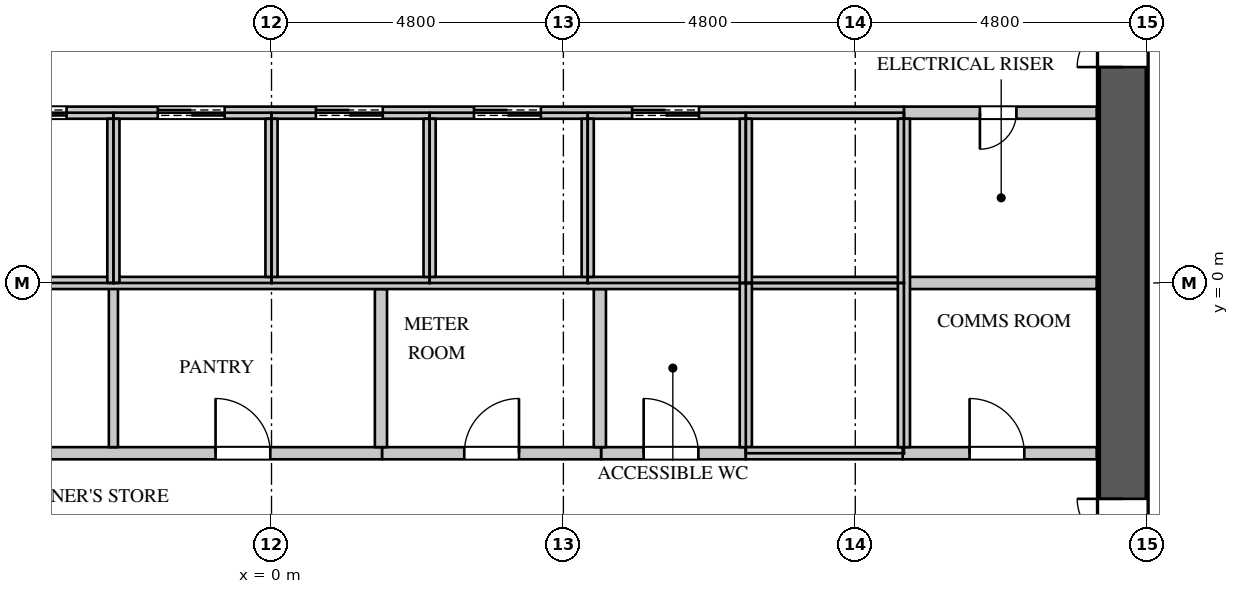
"""IFC4 building model, lengths in metres.
Left out: names, types, materials, properties, quantities, classifications, styles, units other than length and angle.
Written with IfcOpenShell. Run it as: python <this file> out.ifc"""

import sys

from ifc_helpers import new_model, si_unit, direction, frame, frame_2d, origin, place, context, subcontext, project, spatial, rectangle, extrude, element, fill, save


model = new_model("IFC4")
c1 = context("Model", 3, precision=1e-05, world=origin(), true_north=direction((0.0, 1.0)))
c2 = subcontext(c1, "Body", "Model", "MODEL_VIEW")
j1 = project(units=[si_unit("LENGTHUNIT", "METRE"), si_unit("PLANEANGLEUNIT", "RADIAN")], contexts=[c1])
p1 = place(None, origin())
s1 = spatial("IfcSite", under=j1, at=p1, CompositionType="ELEMENT")
p2 = place(p1, origin())
s2 = spatial("IfcBuilding", under=s1, at=p2, CompositionType="ELEMENT")
p3 = place(p2, frame((0.0, 0.0, 148.5)))
s3 = spatial("IfcBuildingStorey", under=s2, at=p3, CompositionType="ELEMENT", Elevation=148.5)
p4 = place(p3, frame((14.0, -11.2, 0.0), z_axis=(0.0, 0.0, 1.0), x_axis=(0.0, 1.0, 0.0)))
e1 = element("IfcWall", 1, at=p4, inside=s3, PredefinedType="SHEAR", context=c2, shape_type="SweptSolid", body=[
    extrude(rectangle(XDim=22.4, YDim=0.8, at=frame_2d((11.2, 0.0))), origin(), (0.0, 0.0, 1.0), 4.2),
])
p5 = place(p4, frame((20.25, 0.0, 0.0)))
e2 = element("IfcOpeningElement", 2, at=p5, cuts=e1, PredefinedType="OPENING", context=c2, shape_type="SweptSolid", body=[
    extrude(rectangle(XDim=1.1, YDim=2.2, at=frame_2d((0.55, 1.1))), frame((0.0, 0.41, 0.0), z_axis=(0.0, -1.0, 0.0), x_axis=(1.0, 0.0, 0.0)), (0.0, 0.0, 1.0), 0.82),
])
p6 = place(p4, frame((1.05, 0.0, 0.0)))
e3 = element("IfcOpeningElement", 3, at=p6, cuts=e1, PredefinedType="OPENING", context=c2, shape_type="SweptSolid", body=[
    extrude(rectangle(XDim=1.1, YDim=2.2, at=frame_2d((0.55, 1.1))), frame((0.0, 0.41, 0.0), z_axis=(0.0, -1.0, 0.0), x_axis=(1.0, 0.0, 0.0)), (0.0, 0.0, 1.0), 0.82),
])
p7 = place(p4, frame((14.75, 0.0, 0.0)))
e4 = element("IfcOpeningElement", 4, at=p7, cuts=e1, PredefinedType="OPENING", context=c2, shape_type="SweptSolid", body=[
    extrude(rectangle(XDim=1.5, YDim=2.4, at=frame_2d((0.75, 1.2))), frame((0.0, 0.41, 0.0), z_axis=(0.0, -1.0, 0.0), x_axis=(1.0, 0.0, 0.0)), (0.0, 0.0, 1.0), 0.82),
])
p8 = place(p4, frame((6.15, 0.0, 0.0)))
e5 = element("IfcOpeningElement", 5, at=p8, cuts=e1, PredefinedType="OPENING", context=c2, shape_type="SweptSolid", body=[
    extrude(rectangle(XDim=1.5, YDim=2.4, at=frame_2d((0.75, 1.2))), frame((0.0, 0.41, 0.0), z_axis=(0.0, -1.0, 0.0), x_axis=(1.0, 0.0, 0.0)), (0.0, 0.0, 1.0), 0.82),
])
p9 = place(p3, frame((-7.82, -2.8, 0.0), z_axis=(0.0, 0.0, 1.0), x_axis=(1.0, 0.0, 0.0)))
e6 = element("IfcWall", 6, at=p9, inside=s3, PredefinedType="PARTITIONING", context=c2, shape_type="SweptSolid", body=[
    extrude(rectangle(XDim=9.64, YDim=0.2, at=frame_2d((4.82, 0.0))), origin(), (0.0, 0.0, 1.0), 3.798),
])
p10 = place(p9, frame((2.25, 0.0, 0.0)))
e7 = element("IfcOpeningElement", 7, at=p10, cuts=e6, PredefinedType="OPENING", context=c2, shape_type="SweptSolid", body=[
    extrude(rectangle(XDim=0.9, YDim=2.2, at=frame_2d((0.45, 1.1))), frame((0.0, 0.11, 0.0), z_axis=(0.0, -1.0, 0.0), x_axis=(1.0, 0.0, 0.0)), (0.0, 0.0, 1.0), 0.22),
])
p11 = place(p9, frame((6.9, 0.0, 0.0)))
e8 = element("IfcOpeningElement", 8, at=p11, cuts=e6, PredefinedType="OPENING", context=c2, shape_type="SweptSolid", body=[
    extrude(rectangle(XDim=0.9, YDim=2.2, at=frame_2d((0.45, 1.1))), frame((0.0, 0.11, 0.0), z_axis=(0.0, -1.0, 0.0), x_axis=(1.0, 0.0, 0.0)), (0.0, 0.0, 1.0), 0.22),
])
p12 = place(p3, frame((5.42, -2.8, 0.0), z_axis=(0.0, 0.0, 1.0), x_axis=(1.0, 0.0, 0.0)))
e9 = element("IfcWall", 9, at=p12, inside=s3, PredefinedType="PARTITIONING", context=c2, shape_type="SweptSolid", body=[
    extrude(rectangle(XDim=2.38, YDim=0.2, at=frame_2d((1.19, 0.0))), origin(), (0.0, 0.0, 1.0), 3.798),
])
p13 = place(p12, frame((0.7, 0.0, 0.0)))
e10 = element("IfcOpeningElement", 10, at=p13, cuts=e9, PredefinedType="OPENING", context=c2, shape_type="SweptSolid", body=[
    extrude(rectangle(XDim=0.9, YDim=2.2, at=frame_2d((0.45, 1.1))), frame((0.0, 0.11, 0.0), z_axis=(0.0, -1.0, 0.0), x_axis=(1.0, 0.0, 0.0)), (0.0, 0.0, 1.0), 0.22),
])
p14 = place(p3, frame((-2.6, -2.7, 0.0), z_axis=(0.0, 0.0, 1.0), x_axis=(0.0, 1.0, 0.0)))
e11 = element("IfcWall", 11, at=p14, inside=s3, PredefinedType="PARTITIONING", context=c2, shape_type="SweptSolid", body=[
    extrude(rectangle(XDim=2.7, YDim=0.15, at=frame_2d((1.35, 0.0))), origin(), (0.0, 0.0, 1.0), 3.798),
])
p15 = place(p3, frame((1.82, -2.8, 0.0), z_axis=(0.0, 0.0, 1.0), x_axis=(1.0, 0.0, 0.0)))
e12 = element("IfcWall", 12, at=p15, inside=s3, PredefinedType="PARTITIONING", context=c2, shape_type="SweptSolid", body=[
    extrude(rectangle(XDim=3.6, YDim=0.2, at=frame_2d((1.8, 0.0))), origin(), (0.0, 0.0, 1.0), 3.798),
])
p16 = place(p15, frame((1.35, 0.0, 0.0)))
e13 = element("IfcOpeningElement", 13, at=p16, cuts=e12, PredefinedType="OPENING", context=c2, shape_type="SweptSolid", body=[
    extrude(rectangle(XDim=0.9, YDim=2.2, at=frame_2d((0.45, 1.1))), frame((0.0, 0.11, 0.0), z_axis=(0.0, -1.0, 0.0), x_axis=(1.0, 0.0, 0.0)), (0.0, 0.0, 1.0), 0.22),
])
for number, where, z_axis, x_axis in (
    (14, (1.8, -2.7, 0.0), (0.0, 0.0, 1.0), (0.0, 1.0, 0.0)),
    (15, (5.4, -2.7, 0.0), (0.0, 0.0, 1.0), (0.0, 1.0, 0.0)),
):
    element("IfcWall", number, at=place(p3, frame(where, z_axis=z_axis, x_axis=x_axis)), inside=s3, PredefinedType="PARTITIONING", context=c2, shape_type="SweptSolid", body=[
        extrude(rectangle(XDim=2.6, YDim=0.2, at=frame_2d((1.3, 0.0))), origin(), (0.0, 0.0, 1.0), 3.798),
    ])
p17 = place(p3, frame((10.38, -2.8, 0.0), z_axis=(0.0, 0.0, 1.0), x_axis=(1.0, 0.0, 0.0)))
e16 = element("IfcWall", 16, at=p17, inside=s3, PredefinedType="PARTITIONING", context=c2, shape_type="SweptSolid", body=[
    extrude(rectangle(XDim=3.19, YDim=0.2, at=frame_2d((1.595, 0.0))), origin(), (0.0, 0.0, 1.0), 3.798),
])
p18 = place(p17, frame((1.1, 0.0, 0.0)))
e17 = element("IfcOpeningElement", 17, at=p18, cuts=e16, PredefinedType="OPENING", context=c2, shape_type="SweptSolid", body=[
    extrude(rectangle(XDim=0.9, YDim=2.2, at=frame_2d((0.45, 1.1))), frame((0.0, 0.11, 0.0), z_axis=(0.0, -1.0, 0.0), x_axis=(1.0, 0.0, 0.0)), (0.0, 0.0, 1.0), 0.22),
])
p19 = place(p3, frame((10.4, 2.8, 0.0), z_axis=(0.0, 0.0, 1.0), x_axis=(1.0, 0.0, 0.0)))
e18 = element("IfcWall", 18, at=p19, inside=s3, PredefinedType="PARTITIONING", context=c2, shape_type="SweptSolid", body=[
    extrude(rectangle(XDim=3.17, YDim=0.2, at=frame_2d((1.585, 0.0))), origin(), (0.0, 0.0, 1.0), 3.798),
])
p20 = place(p19, frame((1.25, 0.0, 0.0)))
e19 = element("IfcOpeningElement", 19, at=p20, cuts=e18, PredefinedType="OPENING", context=c2, shape_type="SweptSolid", body=[
    extrude(rectangle(XDim=0.6, YDim=2.0, at=frame_2d((0.3, 1.0))), frame((0.0, 0.11, 0.0), z_axis=(0.0, -1.0, 0.0), x_axis=(1.0, 0.0, 0.0)), (0.0, 0.0, 1.0), 0.22),
])
p21 = place(p3, frame((10.4, 0.0, 0.0), z_axis=(0.0, 0.0, 1.0), x_axis=(1.0, 0.0, 0.0)))
e20 = element("IfcWall", 20, at=p21, inside=s3, PredefinedType="PARTITIONING", context=c2, shape_type="SweptSolid", body=[
    extrude(rectangle(XDim=3.17, YDim=0.2, at=frame_2d((1.585, 0.0))), origin(), (0.0, 0.0, 1.0), 3.798),
])
p22 = place(p3, frame((-13.57, 0.0, 0.0), z_axis=(0.0, 0.0, 1.0), x_axis=(1.0, 0.0, 0.0)))
e21 = element("IfcWall", 21, at=p22, inside=s3, PredefinedType="PARTITIONING", context=c2, shape_type="SweptSolid", body=[
    extrude(rectangle(XDim=23.97, YDim=0.2, at=frame_2d((11.985, 0.0))), origin(), (0.0, 0.0, 1.0), 3.798),
])
p23 = place(p3, frame((-13.57, 2.8, 0.0), z_axis=(0.0, 0.0, 1.0), x_axis=(1.0, 0.0, 0.0)))
e22 = element("IfcWall", 22, at=p23, inside=s3, PredefinedType="PARTITIONING", context=c2, shape_type="SweptSolid", body=[
    extrude(rectangle(XDim=23.97, YDim=0.2, at=frame_2d((11.985, 0.0))), origin(), (0.0, 0.0, 1.0), 3.798),
])
p24 = place(p23, frame((1.0, 0.0, 0.0)))
e23 = element("IfcOpeningElement", 23, at=p24, cuts=e22, PredefinedType="OPENING", context=c2, shape_type="SweptSolid", body=[
    extrude(rectangle(XDim=1.1, YDim=2.2, at=frame_2d((0.55, 1.1))), frame((0.0, 0.11, 0.0), z_axis=(0.0, -1.0, 0.0), x_axis=(1.0, 0.0, 0.0)), (0.0, 0.0, 1.0), 0.22),
])
p25 = place(p23, frame((3.9, 0.0, 0.0)))
e24 = element("IfcOpeningElement", 24, at=p25, cuts=e22, PredefinedType="OPENING", context=c2, shape_type="SweptSolid", body=[
    extrude(rectangle(XDim=1.1, YDim=2.2, at=frame_2d((0.55, 1.1))), frame((0.0, 0.11, 0.0), z_axis=(0.0, -1.0, 0.0), x_axis=(1.0, 0.0, 0.0)), (0.0, 0.0, 1.0), 0.22),
])
p26 = place(p23, frame((6.5, 0.0, 0.0)))
e25 = element("IfcOpeningElement", 25, at=p26, cuts=e22, PredefinedType="OPENING", context=c2, shape_type="SweptSolid", body=[
    extrude(rectangle(XDim=1.1, YDim=2.2, at=frame_2d((0.55, 1.1))), frame((0.0, 0.11, 0.0), z_axis=(0.0, -1.0, 0.0), x_axis=(1.0, 0.0, 0.0)), (0.0, 0.0, 1.0), 0.22),
])
p27 = place(p23, frame((9.1, 0.0, 0.0)))
e26 = element("IfcOpeningElement", 26, at=p27, cuts=e22, PredefinedType="OPENING", context=c2, shape_type="SweptSolid", body=[
    extrude(rectangle(XDim=1.1, YDim=2.2, at=frame_2d((0.55, 1.1))), frame((0.0, 0.11, 0.0), z_axis=(0.0, -1.0, 0.0), x_axis=(1.0, 0.0, 0.0)), (0.0, 0.0, 1.0), 0.22),
])
p28 = place(p23, frame((11.7, 0.0, 0.0)))
e27 = element("IfcOpeningElement", 27, at=p28, cuts=e22, PredefinedType="OPENING", context=c2, shape_type="SweptSolid", body=[
    extrude(rectangle(XDim=1.1, YDim=2.2, at=frame_2d((0.55, 1.1))), frame((0.0, 0.11, 0.0), z_axis=(0.0, -1.0, 0.0), x_axis=(1.0, 0.0, 0.0)), (0.0, 0.0, 1.0), 0.22),
])
p29 = place(p23, frame((14.3, 0.0, 0.0)))
e28 = element("IfcOpeningElement", 28, at=p29, cuts=e22, PredefinedType="OPENING", context=c2, shape_type="SweptSolid", body=[
    extrude(rectangle(XDim=1.1, YDim=2.2, at=frame_2d((0.55, 1.1))), frame((0.0, 0.11, 0.0), z_axis=(0.0, -1.0, 0.0), x_axis=(1.0, 0.0, 0.0)), (0.0, 0.0, 1.0), 0.22),
])
p30 = place(p23, frame((16.9, 0.0, 0.0)))
e29 = element("IfcOpeningElement", 29, at=p30, cuts=e22, PredefinedType="OPENING", context=c2, shape_type="SweptSolid", body=[
    extrude(rectangle(XDim=1.1, YDim=2.2, at=frame_2d((0.55, 1.1))), frame((0.0, 0.11, 0.0), z_axis=(0.0, -1.0, 0.0), x_axis=(1.0, 0.0, 0.0)), (0.0, 0.0, 1.0), 0.22),
])
p31 = place(p23, frame((19.5, 0.0, 0.0)))
e30 = element("IfcOpeningElement", 30, at=p31, cuts=e22, PredefinedType="OPENING", context=c2, shape_type="SweptSolid", body=[
    extrude(rectangle(XDim=1.1, YDim=2.2, at=frame_2d((0.55, 1.1))), frame((0.0, 0.11, 0.0), z_axis=(0.0, -1.0, 0.0), x_axis=(1.0, 0.0, 0.0)), (0.0, 0.0, 1.0), 0.22),
])
p32 = place(p3, frame((-2.6, 0.0, 0.0), z_axis=(0.0, 0.0, 1.0), x_axis=(0.0, 1.0, 0.0)))
e31 = element("IfcWall", 31, at=p32, inside=s3, PredefinedType="PARTITIONING", context=c2, shape_type="SweptSolid", body=[
    extrude(rectangle(XDim=2.7, YDim=0.2, at=frame_2d((1.35, 0.0))), origin(), (0.0, 0.0, 1.0), 3.798),
])
for number, where, z_axis, x_axis in (
    (32, (0.0, 0.1, 0.0), (0.0, 0.0, 1.0), (0.0, 1.0, 0.0)),
    (33, (2.6, 0.1, 0.0), (0.0, 0.0, 1.0), (0.0, 1.0, 0.0)),
    (34, (5.2, 0.1, 0.0), (0.0, 0.0, 1.0), (0.0, 1.0, 0.0)),
):
    element("IfcWall", number, at=place(p3, frame(where, z_axis=z_axis, x_axis=x_axis)), inside=s3, PredefinedType="PARTITIONING", context=c2, shape_type="SweptSolid", body=[
        extrude(rectangle(XDim=2.6, YDim=0.2, at=frame_2d((1.3, 0.0))), origin(), (0.0, 0.0, 1.0), 3.798),
    ])
p33 = place(p3, frame((7.8, -2.7, 0.0), z_axis=(0.0, 0.0, 1.0), x_axis=(0.0, 1.0, 0.0)))
e35 = element("IfcWall", 35, at=p33, inside=s3, PredefinedType="PARTITIONING", context=c2, shape_type="SweptSolid", body=[
    extrude(rectangle(XDim=2.7, YDim=0.2, at=frame_2d((1.35, 0.0))), origin(), (0.0, 0.0, 1.0), 3.798),
])
p34 = place(p3, frame((7.8, -2.8, 0.0), z_axis=(0.0, 0.0, 1.0), x_axis=(1.0, 0.0, 0.0)))
e36 = element("IfcWall", 36, at=p34, inside=s3, PredefinedType="PARTITIONING", context=c2, shape_type="SweptSolid", body=[
    extrude(rectangle(XDim=2.58, YDim=0.2, at=frame_2d((1.29, 0.0))), origin(), (0.0, 0.0, 1.0), 3.798),
])
p35 = place(p3, frame((7.8, 0.0, 0.0), z_axis=(0.0, 0.0, 1.0), x_axis=(0.0, 1.0, 0.0)))
e37 = element("IfcWall", 37, at=p35, inside=s3, PredefinedType="PARTITIONING", context=c2, shape_type="SweptSolid", body=[
    extrude(rectangle(XDim=2.7, YDim=0.2, at=frame_2d((1.35, 0.0))), origin(), (0.0, 0.0, 1.0), 3.798),
])
p36 = place(p3, frame((10.4, -2.7, 0.0), z_axis=(0.0, 0.0, 1.0), x_axis=(0.0, 1.0, 0.0)))
e38 = element("IfcWall", 38, at=p36, inside=s3, PredefinedType="PARTITIONING", context=c2, shape_type="SweptSolid", body=[
    extrude(rectangle(XDim=5.4, YDim=0.2, at=frame_2d((2.7, 0.0))), origin(), (0.0, 0.0, 1.0), 3.798),
])
p37 = place(p20, origin())
e39 = element("IfcDoor", 39, at=p37, inside=s3, OperationType="SINGLE_SWING_RIGHT", PredefinedType="DOOR", context=c2, shape_type="SweptSolid", body=[
    extrude(rectangle(XDim=0.6, YDim=2.0, at=frame_2d((0.3, 1.0))), frame((0.0, 0.025, 0.0), z_axis=(0.0, -1.0, 0.0), x_axis=(1.0, 0.0, 0.0)), (0.0, 0.0, 1.0), 0.05),
])
fill(e19, e39)
p38 = place(p18, origin())
e40 = element("IfcDoor", 40, at=p38, inside=s3, OperationType="SINGLE_SWING_LEFT", PredefinedType="DOOR", context=c2, shape_type="SweptSolid", body=[
    extrude(rectangle(XDim=0.9, YDim=2.2, at=frame_2d((0.45, 1.1))), frame((0.0, 0.025, 0.0), z_axis=(0.0, -1.0, 0.0), x_axis=(1.0, 0.0, 0.0)), (0.0, 0.0, 1.0), 0.05),
])
fill(e17, e40)
p39 = place(p11, origin())
e41 = element("IfcDoor", 41, at=p39, inside=s3, OperationType="SINGLE_SWING_LEFT", PredefinedType="DOOR", context=c2, shape_type="SweptSolid", body=[
    extrude(rectangle(XDim=0.9, YDim=2.2, at=frame_2d((0.45, 1.1))), frame((0.0, 0.025, 0.0), z_axis=(0.0, -1.0, 0.0), x_axis=(1.0, 0.0, 0.0)), (0.0, 0.0, 1.0), 0.05),
])
fill(e8, e41)
p40 = place(p16, origin())
e42 = element("IfcDoor", 42, at=p40, inside=s3, OperationType="SINGLE_SWING_RIGHT", PredefinedType="DOOR", context=c2, shape_type="SweptSolid", body=[
    extrude(rectangle(XDim=0.9, YDim=2.2, at=frame_2d((0.45, 1.1))), frame((0.0, 0.025, 0.0), z_axis=(0.0, -1.0, 0.0), x_axis=(1.0, 0.0, 0.0)), (0.0, 0.0, 1.0), 0.05),
])
fill(e13, e42)
p41 = place(p13, origin())
e43 = element("IfcDoor", 43, at=p41, inside=s3, OperationType="SINGLE_SWING_LEFT", PredefinedType="DOOR", context=c2, shape_type="SweptSolid", body=[
    extrude(rectangle(XDim=0.9, YDim=2.2, at=frame_2d((0.45, 1.1))), frame((0.0, 0.025, 0.0), z_axis=(0.0, -1.0, 0.0), x_axis=(1.0, 0.0, 0.0)), (0.0, 0.0, 1.0), 0.05),
])
fill(e10, e43)
p42 = place(p27, origin())
e44 = element("IfcDoor", 44, at=p42, inside=s3, OperationType="DOUBLE_DOOR_SLIDING", PredefinedType="DOOR", context=c2, shape_type="SweptSolid", body=[
    extrude(rectangle(XDim=1.1, YDim=2.2, at=frame_2d((0.55, 1.1))), frame((0.0, 0.025, 0.0), z_axis=(0.0, -1.0, 0.0), x_axis=(1.0, 0.0, 0.0)), (0.0, 0.0, 1.0), 0.05),
])
fill(e26, e44)
p43 = place(p28, origin())
e45 = element("IfcDoor", 45, at=p43, inside=s3, OperationType="DOUBLE_DOOR_SLIDING", PredefinedType="DOOR", context=c2, shape_type="SweptSolid", body=[
    extrude(rectangle(XDim=1.1, YDim=2.2, at=frame_2d((0.55, 1.1))), frame((0.0, 0.025, 0.0), z_axis=(0.0, -1.0, 0.0), x_axis=(1.0, 0.0, 0.0)), (0.0, 0.0, 1.0), 0.05),
])
fill(e27, e45)
p44 = place(p29, origin())
e46 = element("IfcDoor", 46, at=p44, inside=s3, OperationType="DOUBLE_DOOR_SLIDING", PredefinedType="DOOR", context=c2, shape_type="SweptSolid", body=[
    extrude(rectangle(XDim=1.1, YDim=2.2, at=frame_2d((0.55, 1.1))), frame((0.0, 0.025, 0.0), z_axis=(0.0, -1.0, 0.0), x_axis=(1.0, 0.0, 0.0)), (0.0, 0.0, 1.0), 0.05),
])
fill(e28, e46)
p45 = place(p30, origin())
e47 = element("IfcDoor", 47, at=p45, inside=s3, OperationType="DOUBLE_DOOR_SLIDING", PredefinedType="DOOR", context=c2, shape_type="SweptSolid", body=[
    extrude(rectangle(XDim=1.1, YDim=2.2, at=frame_2d((0.55, 1.1))), frame((0.0, 0.025, 0.0), z_axis=(0.0, -1.0, 0.0), x_axis=(1.0, 0.0, 0.0)), (0.0, 0.0, 1.0), 0.05),
])
fill(e29, e47)
p46 = place(p31, origin())
e48 = element("IfcDoor", 48, at=p46, inside=s3, OperationType="DOUBLE_DOOR_SLIDING", PredefinedType="DOOR", context=c2, shape_type="SweptSolid", body=[
    extrude(rectangle(XDim=1.1, YDim=2.2, at=frame_2d((0.55, 1.1))), frame((0.0, 0.025, 0.0), z_axis=(0.0, -1.0, 0.0), x_axis=(1.0, 0.0, 0.0)), (0.0, 0.0, 1.0), 0.05),
])
fill(e30, e48)
p47 = place(p7, origin())
e49 = element("IfcDoor", 49, at=p47, inside=s3, OperationType="DOUBLE_DOOR_SINGLE_SWING", PredefinedType="DOOR", context=c2, shape_type="SweptSolid", body=[
    extrude(rectangle(XDim=1.5, YDim=2.4, at=frame_2d((0.75, 1.2))), frame((0.0, 0.395, 0.0), z_axis=(0.0, -1.0, 0.0), x_axis=(1.0, 0.0, 0.0)), (0.0, 0.0, 1.0), 0.05),
])
fill(e4, e49)
p48 = place(p8, origin())
e50 = element("IfcDoor", 50, at=p48, inside=s3, OperationType="DOUBLE_DOOR_SINGLE_SWING", PredefinedType="DOOR", context=c2, shape_type="SweptSolid", body=[
    extrude(rectangle(XDim=1.5, YDim=2.4, at=frame_2d((0.75, 1.2))), frame((0.0, 0.395, 0.0), z_axis=(0.0, -1.0, 0.0), x_axis=(1.0, 0.0, 0.0)), (0.0, 0.0, 1.0), 0.05),
])
fill(e5, e50)
save(model, sys.argv[1])
